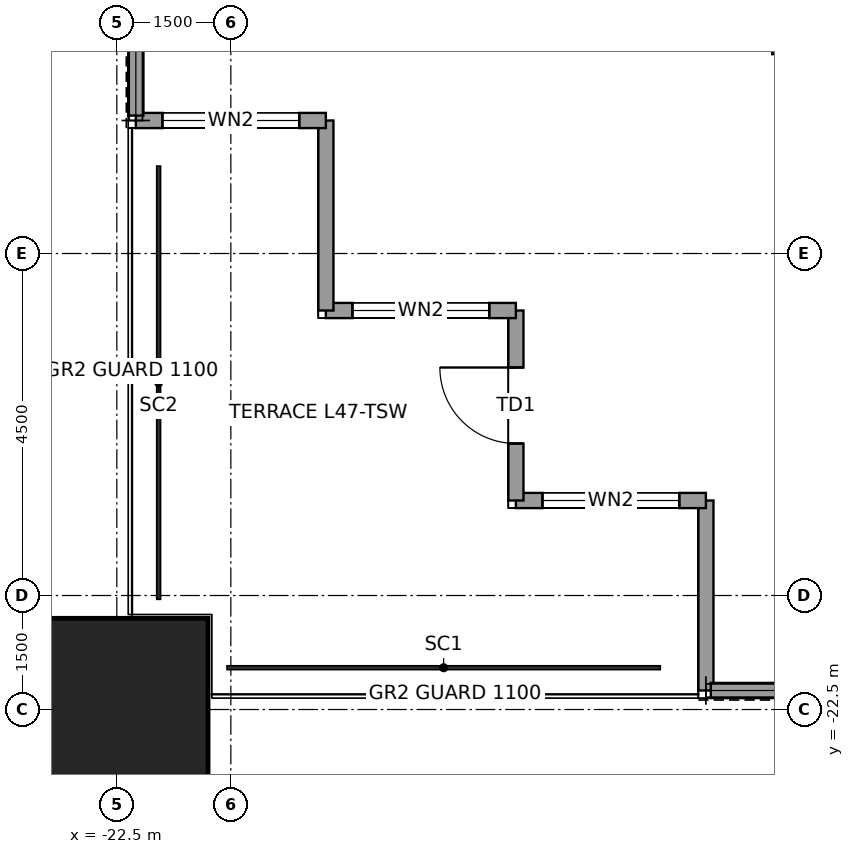
"""IFC4 building model, lengths in metres.
Left out: names, types, materials, properties, quantities, classifications, styles, units other than length and angle.
Written with IfcOpenShell. Run it as: python <this file> out.ifc"""

import sys

from ifc_helpers import new_model, si_unit, direction, frame, frame_2d, origin, origin_2d, place, context, subcontext, project, spatial, rectangle, hollow_rectangle, extrude, element, fill, save


model = new_model("IFC4")
c1 = context("Model", 3, precision=1e-05, world=origin(), true_north=direction((0.0, 1.0)))
c2 = subcontext(c1, "Body", "Model", "MODEL_VIEW")
j1 = project(units=[si_unit("LENGTHUNIT", "METRE"), si_unit("PLANEANGLEUNIT", "RADIAN")], contexts=[c1])
p1 = place(None, origin())
s1 = spatial("IfcSite", under=j1, at=p1, CompositionType="ELEMENT")
p2 = place(p1, origin())
s2 = spatial("IfcBuilding", under=s1, at=p2, CompositionType="ELEMENT")
p3 = place(p2, frame((0.0, 0.0, 221.9)))
s3 = spatial("IfcBuildingStorey", under=s2, at=p3, CompositionType="ELEMENT", Elevation=221.9)
p4 = place(p3, frame((-22.5, -22.5, 0.0), z_axis=(0.0, 0.0, 1.0), x_axis=(1.0, 0.0, 0.0)))
e1 = element("IfcColumn", 1, at=p4, inside=s3, PredefinedType="COLUMN", context=c2, shape_type="SweptSolid", body=[
    extrude(hollow_rectangle(XDim=2.4, YDim=2.4, WallThickness=0.12, at=origin_2d()), origin(), (0.0, 0.0, 1.0), 4.0),
])
p5 = place(p3, frame((-14.75, -22.25, 0.0), z_axis=(0.0, 0.0, 1.0), x_axis=(0.0, 1.0, 0.0)))
e2 = element("IfcWall", 2, at=p5, inside=s3, PredefinedType="SOLIDWALL", context=c2, shape_type="SweptSolid", body=[
    extrude(rectangle(XDim=2.5, YDim=0.2, at=frame_2d((1.25, 0.0))), origin(), (0.0, 0.0, 1.0), 3.85),
])
p6 = place(p3, frame((-14.75, -19.75, 0.0), z_axis=(0.0, 0.0, 1.0), x_axis=(-1.0, 0.0, 0.0)))
e3 = element("IfcWall", 3, at=p6, inside=s3, PredefinedType="SOLIDWALL", context=c2, shape_type="SweptSolid", body=[
    extrude(rectangle(XDim=2.5, YDim=0.2, at=frame_2d((1.25, 0.0))), origin(), (0.0, 0.0, 1.0), 3.85),
])
p7 = place(p6, frame((0.35, 0.0, 0.3)))
e4 = element("IfcOpeningElement", 4, at=p7, cuts=e3, PredefinedType="OPENING", context=c2, shape_type="SweptSolid", body=[
    extrude(rectangle(XDim=1.8, YDim=2.4, at=frame_2d((0.9, 1.2))), frame((0.0, 0.11, 0.0), z_axis=(0.0, -1.0, 0.0), x_axis=(1.0, 0.0, 0.0)), (0.0, 0.0, 1.0), 0.22),
])
p8 = place(p3, frame((-17.25, -19.75, 0.0), z_axis=(0.0, 0.0, 1.0), x_axis=(0.0, 1.0, 0.0)))
e5 = element("IfcWall", 5, at=p8, inside=s3, PredefinedType="SOLIDWALL", context=c2, shape_type="SweptSolid", body=[
    extrude(rectangle(XDim=2.5, YDim=0.2, at=frame_2d((1.25, 0.0))), origin(), (0.0, 0.0, 1.0), 3.85),
])
p9 = place(p8, frame((0.75, 0.0, 0.0)))
e6 = element("IfcOpeningElement", 6, at=p9, cuts=e5, PredefinedType="OPENING", context=c2, shape_type="SweptSolid", body=[
    extrude(rectangle(XDim=1.0, YDim=2.4, at=frame_2d((0.5, 1.2))), frame((0.0, 0.11, 0.0), z_axis=(0.0, -1.0, 0.0), x_axis=(1.0, 0.0, 0.0)), (0.0, 0.0, 1.0), 0.22),
])
p10 = place(p3, frame((-17.25, -17.25, 0.0), z_axis=(0.0, 0.0, 1.0), x_axis=(-1.0, 0.0, 0.0)))
e7 = element("IfcWall", 7, at=p10, inside=s3, PredefinedType="SOLIDWALL", context=c2, shape_type="SweptSolid", body=[
    extrude(rectangle(XDim=2.5, YDim=0.2, at=frame_2d((1.25, 0.0))), origin(), (0.0, 0.0, 1.0), 3.85),
])
p11 = place(p10, frame((0.35, 0.0, 0.3)))
e8 = element("IfcOpeningElement", 8, at=p11, cuts=e7, PredefinedType="OPENING", context=c2, shape_type="SweptSolid", body=[
    extrude(rectangle(XDim=1.8, YDim=2.4, at=frame_2d((0.9, 1.2))), frame((0.0, 0.11, 0.0), z_axis=(0.0, -1.0, 0.0), x_axis=(1.0, 0.0, 0.0)), (0.0, 0.0, 1.0), 0.22),
])
p12 = place(p3, frame((-19.75, -17.25, 0.0), z_axis=(0.0, 0.0, 1.0), x_axis=(0.0, 1.0, 0.0)))
e9 = element("IfcWall", 9, at=p12, inside=s3, PredefinedType="SOLIDWALL", context=c2, shape_type="SweptSolid", body=[
    extrude(rectangle(XDim=2.5, YDim=0.2, at=frame_2d((1.25, 0.0))), origin(), (0.0, 0.0, 1.0), 3.85),
])
p13 = place(p3, frame((-19.75, -14.75, 0.0), z_axis=(0.0, 0.0, 1.0), x_axis=(-1.0, 0.0, 0.0)))
e10 = element("IfcWall", 10, at=p13, inside=s3, PredefinedType="SOLIDWALL", context=c2, shape_type="SweptSolid", body=[
    extrude(rectangle(XDim=2.5, YDim=0.2, at=frame_2d((1.25, 0.0))), origin(), (0.0, 0.0, 1.0), 3.85),
])
p14 = place(p13, frame((0.35, 0.0, 0.3)))
e11 = element("IfcOpeningElement", 11, at=p14, cuts=e10, PredefinedType="OPENING", context=c2, shape_type="SweptSolid", body=[
    extrude(rectangle(XDim=1.8, YDim=2.4, at=frame_2d((0.9, 1.2))), frame((0.0, 0.11, 0.0), z_axis=(0.0, -1.0, 0.0), x_axis=(1.0, 0.0, 0.0)), (0.0, 0.0, 1.0), 0.22),
])
for number, where, z_axis, x_axis in (
    (12, (-12.366, -22.25, 0.0), (0.0, 0.0, 1.0), (-1.0, 0.0, 0.0)),
    (13, (-22.25, -14.685, 0.0), (0.0, 0.0, 1.0), (0.0, 1.0, 0.0)),
):
    element("IfcWall", number, at=place(p3, frame(where, z_axis=z_axis, x_axis=x_axis)), inside=s3, PredefinedType="SOLIDWALL", context=c2, shape_type="SweptSolid", body=[
        extrude(rectangle(XDim=2.319, YDim=0.2, at=frame_2d((1.16, 0.0))), origin(), (0.0, 0.0, 1.0), 3.85),
    ])
p15 = place(p3, frame((-13.875, -13.8, 0.0), z_axis=(0.0, 0.0, 1.0), x_axis=(1.0, 0.0, 0.0)))
e14 = element("IfcWall", 14, at=p15, inside=s3, PredefinedType="PARTITIONING", context=c2, shape_type="SweptSolid", body=[
    extrude(rectangle(XDim=8.95, YDim=0.15, at=frame_2d((4.475, 0.0))), origin(), (0.0, 0.0, 1.0), 3.85),
])
p16 = place(p15, frame((3.975, 0.0, 0.0)))
e15 = element("IfcOpeningElement", 15, at=p16, cuts=e14, PredefinedType="OPENING", context=c2, shape_type="SweptSolid", body=[
    extrude(rectangle(XDim=1.0, YDim=2.4, at=frame_2d((0.5, 1.2))), frame((0.0, 0.085, 0.0), z_axis=(0.0, -1.0, 0.0), x_axis=(1.0, 0.0, 0.0)), (0.0, 0.0, 1.0), 0.17),
])
p17 = place(p3, frame((-13.8, -13.875, 0.0), z_axis=(0.0, 0.0, 1.0), x_axis=(0.0, 1.0, 0.0)))
e16 = element("IfcWall", 16, at=p17, inside=s3, PredefinedType="PARTITIONING", context=c2, shape_type="SweptSolid", body=[
    extrude(rectangle(XDim=25.95, YDim=0.15, at=frame_2d((12.975, 0.0))), origin(), (0.0, 0.0, 1.0), 3.85),
])
p18 = place(p7, origin())
e17 = element("IfcWindow", 17, at=p18, inside=s3, PartitioningType="SINGLE_PANEL", PredefinedType="WINDOW", context=c2, shape_type="SweptSolid", body=[
    extrude(rectangle(XDim=1.8, YDim=2.4, at=frame_2d((0.9, 1.2))), frame((0.0, 0.03, 0.0), z_axis=(0.0, -1.0, 0.0), x_axis=(1.0, 0.0, 0.0)), (0.0, 0.0, 1.0), 0.06),
])
fill(e4, e17)
p19 = place(p9, origin())
e18 = element("IfcDoor", 18, at=p19, inside=s3, OperationType="SINGLE_SWING_RIGHT", PredefinedType="DOOR", context=c2, shape_type="SweptSolid", body=[
    extrude(rectangle(XDim=1.0, YDim=2.4, at=frame_2d((0.5, 1.2))), frame((0.0, 0.025, 0.0), z_axis=(0.0, -1.0, 0.0), x_axis=(1.0, 0.0, 0.0)), (0.0, 0.0, 1.0), 0.05),
])
fill(e6, e18)
p20 = place(p11, origin())
e19 = element("IfcWindow", 19, at=p20, inside=s3, PartitioningType="SINGLE_PANEL", PredefinedType="WINDOW", context=c2, shape_type="SweptSolid", body=[
    extrude(rectangle(XDim=1.8, YDim=2.4, at=frame_2d((0.9, 1.2))), frame((0.0, 0.03, 0.0), z_axis=(0.0, -1.0, 0.0), x_axis=(1.0, 0.0, 0.0)), (0.0, 0.0, 1.0), 0.06),
])
fill(e8, e19)
p21 = place(p14, origin())
e20 = element("IfcWindow", 20, at=p21, inside=s3, PartitioningType="SINGLE_PANEL", PredefinedType="WINDOW", context=c2, shape_type="SweptSolid", body=[
    extrude(rectangle(XDim=1.8, YDim=2.4, at=frame_2d((0.9, 1.2))), frame((0.0, 0.03, 0.0), z_axis=(0.0, -1.0, 0.0), x_axis=(1.0, 0.0, 0.0)), (0.0, 0.0, 1.0), 0.06),
])
fill(e11, e20)
save(model, sys.argv[1])
